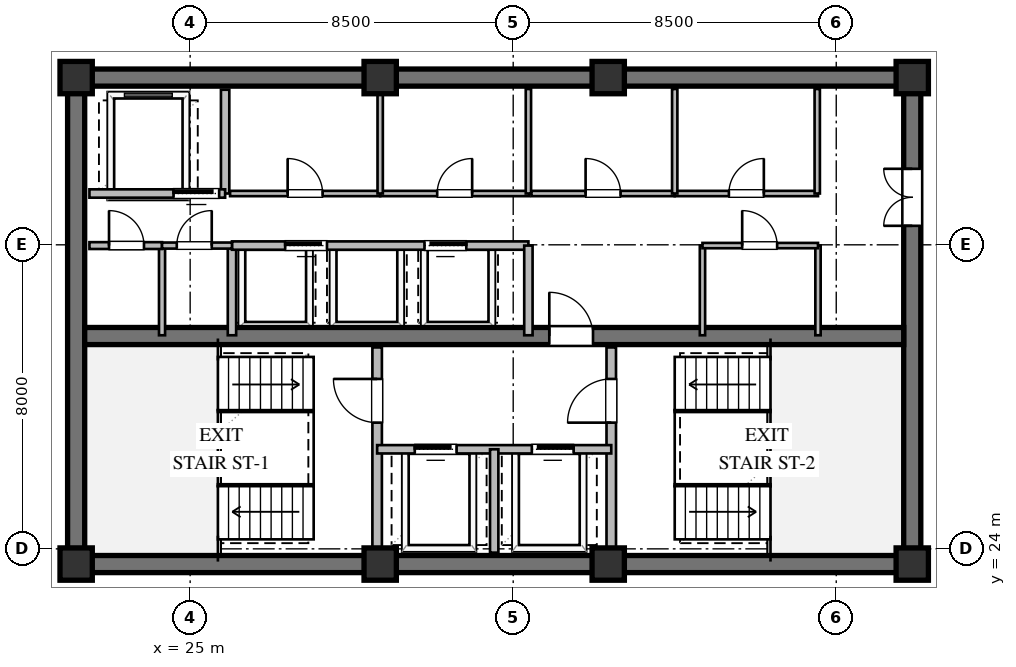
"""IFC4 building model, lengths in metres.
Left out: names, types, materials, properties, quantities, classifications, styles, units other than length and angle.
Written with IfcOpenShell. Run it as: python <this file> out.ifc"""

import sys

from ifc_helpers import new_model, si_unit, direction, frame, frame_2d, origin, origin_2d, place, context, subcontext, project, spatial, rectangle, extrude, element, fill, save


model = new_model("IFC4")
c1 = context("Model", 3, precision=1e-05, world=origin(), true_north=direction((0.0, 1.0)))
c2 = subcontext(c1, "Body", "Model", "MODEL_VIEW")
j1 = project(units=[si_unit("LENGTHUNIT", "METRE"), si_unit("PLANEANGLEUNIT", "RADIAN")], contexts=[c1])
p1 = place(None, origin())
s1 = spatial("IfcSite", under=j1, at=p1, CompositionType="ELEMENT")
p2 = place(p1, origin())
s2 = spatial("IfcBuilding", under=s1, at=p2, CompositionType="ELEMENT")
p3 = place(p2, frame((0.0, 0.0, 238.8)))
s3 = spatial("IfcBuildingStorey", under=s2, at=p3, CompositionType="ELEMENT", Elevation=238.8)
for number, where, z_axis, x_axis in (
    (1, (21.775, 23.6, 0.0), (0.0, 0.0, 1.0), (1.0, 0.0, 0.0)),
    (2, (21.775, 36.4, 0.0), (0.0, 0.0, 1.0), (1.0, 0.0, 0.0)),
):
    element("IfcWall", number, at=place(p3, frame(where, z_axis=z_axis, x_axis=x_axis)), inside=s3, PredefinedType="SHEAR", context=c2, shape_type="SweptSolid", body=[
        extrude(rectangle(XDim=22.45, YDim=0.45, at=frame_2d((11.225, 0.0))), origin(), (0.0, 0.0, 1.0), 3.36),
    ])
p4 = place(p3, frame((22.0, 23.825, 0.0), z_axis=(0.0, 0.0, 1.0), x_axis=(0.0, 1.0, 0.0)))
e3 = element("IfcWall", 3, at=p4, inside=s3, PredefinedType="SHEAR", context=c2, shape_type="SweptSolid", body=[
    extrude(rectangle(XDim=12.35, YDim=0.45, at=frame_2d((6.175, 0.0))), origin(), (0.0, 0.0, 1.0), 3.36),
])
p5 = place(p3, frame((44.0, 23.825, 0.0), z_axis=(0.0, 0.0, 1.0), x_axis=(0.0, 1.0, 0.0)))
e4 = element("IfcWall", 4, at=p5, inside=s3, PredefinedType="SHEAR", context=c2, shape_type="SweptSolid", body=[
    extrude(rectangle(XDim=12.35, YDim=0.45, at=frame_2d((6.175, 0.0))), origin(), (0.0, 0.0, 1.0), 3.36),
])
p6 = place(p5, frame((8.675, 0.0, 0.0)))
e5 = element("IfcOpeningElement", 5, at=p6, cuts=e4, PredefinedType="OPENING", context=c2, shape_type="SweptSolid", body=[
    extrude(rectangle(XDim=1.5, YDim=2.15, at=frame_2d((0.75, 1.075))), frame((0.0, 0.235, 0.0), z_axis=(0.0, -1.0, 0.0), x_axis=(1.0, 0.0, 0.0)), (0.0, 0.0, 1.0), 0.47),
])
p7 = place(p3, frame((22.225, 29.6, 0.0), z_axis=(0.0, 0.0, 1.0), x_axis=(1.0, 0.0, 0.0)))
e6 = element("IfcWall", 6, at=p7, inside=s3, PredefinedType="SHEAR", context=c2, shape_type="SweptSolid", body=[
    extrude(rectangle(XDim=21.55, YDim=0.45, at=frame_2d((10.775, 0.0))), origin(), (0.0, 0.0, 1.0), 3.36),
])
p8 = place(p7, frame((12.225, 0.0, 0.0)))
e7 = element("IfcOpeningElement", 7, at=p8, cuts=e6, PredefinedType="OPENING", context=c2, shape_type="SweptSolid", body=[
    extrude(rectangle(XDim=1.15, YDim=2.1, at=frame_2d((0.575, 1.05))), frame((0.0, 0.235, 0.0), z_axis=(0.0, -1.0, 0.0), x_axis=(1.0, 0.0, 0.0)), (0.0, 0.0, 1.0), 0.47),
])
for number, where, z_axis, x_axis in (
    (8, (22.0, 23.6, 0.0), (0.0, 0.0, 1.0), (1.0, 0.0, 0.0)),
    (9, (30.0, 23.6, 0.0), (0.0, 0.0, 1.0), (1.0, 0.0, 0.0)),
    (10, (36.0, 23.6, 0.0), (0.0, 0.0, 1.0), (1.0, 0.0, 0.0)),
    (11, (44.0, 23.6, 0.0), (0.0, 0.0, 1.0), (1.0, 0.0, 0.0)),
    (12, (44.0, 36.4, 0.0), (0.0, 0.0, 1.0), (1.0, 0.0, 0.0)),
    (13, (36.0, 36.4, 0.0), (0.0, 0.0, 1.0), (1.0, 0.0, 0.0)),
    (14, (30.0, 36.4, 0.0), (0.0, 0.0, 1.0), (1.0, 0.0, 0.0)),
    (15, (22.0, 36.4, 0.0), (0.0, 0.0, 1.0), (1.0, 0.0, 0.0)),
):
    element("IfcColumn", number, at=place(p3, frame(where, z_axis=z_axis, x_axis=x_axis)), inside=s3, PredefinedType="COLUMN", context=c2, shape_type="SweptSolid", body=[
        extrude(rectangle(XDim=0.85, YDim=0.85, at=origin_2d()), origin(), (0.0, 0.0, 1.0), 3.6),
    ])
p9 = place(p3, frame((29.92, 23.9, 0.0), z_axis=(0.0, 0.0, 1.0), x_axis=(0.0, 1.0, 0.0)))
e16 = element("IfcWall", 16, at=p9, inside=s3, PredefinedType="SOLIDWALL", context=c2, shape_type="SweptSolid", body=[
    extrude(rectangle(XDim=5.4, YDim=0.25, at=frame_2d((2.7, 0.0))), origin(), (0.0, 0.0, 1.0), 3.36),
])
p10 = place(p9, frame((3.421, 0.0, 0.0)))
e17 = element("IfcOpeningElement", 17, at=p10, cuts=e16, PredefinedType="OPENING", context=c2, shape_type="SweptSolid", body=[
    extrude(rectangle(XDim=1.15, YDim=2.1, at=frame_2d((0.575, 1.05))), frame((0.0, 0.135, 0.0), z_axis=(0.0, -1.0, 0.0), x_axis=(1.0, 0.0, 0.0)), (0.0, 0.0, 1.0), 0.27),
])
p11 = place(p3, frame((36.08, 23.9, 0.0), z_axis=(0.0, 0.0, 1.0), x_axis=(0.0, 1.0, 0.0)))
e18 = element("IfcWall", 18, at=p11, inside=s3, PredefinedType="SOLIDWALL", context=c2, shape_type="SweptSolid", body=[
    extrude(rectangle(XDim=5.4, YDim=0.25, at=frame_2d((2.7, 0.0))), origin(), (0.0, 0.0, 1.0), 3.36),
])
p12 = place(p11, frame((3.421, 0.0, 0.0)))
e19 = element("IfcOpeningElement", 19, at=p12, cuts=e18, PredefinedType="OPENING", context=c2, shape_type="SweptSolid", body=[
    extrude(rectangle(XDim=1.15, YDim=2.1, at=frame_2d((0.575, 1.05))), frame((0.0, 0.135, 0.0), z_axis=(0.0, -1.0, 0.0), x_axis=(1.0, 0.0, 0.0)), (0.0, 0.0, 1.0), 0.27),
])
p13 = place(p3, frame((29.92, 26.62, 0.0), z_axis=(0.0, 0.0, 1.0), x_axis=(1.0, 0.0, 0.0)))
e20 = element("IfcWall", 20, at=p13, inside=s3, PredefinedType="SOLIDWALL", context=c2, shape_type="SweptSolid", body=[
    extrude(rectangle(XDim=6.16, YDim=0.22, at=frame_2d((3.08, 0.0))), origin(), (0.0, 0.0, 1.0), 3.36),
])
p14 = place(p13, frame((0.99, 0.0, 0.0)))
e21 = element("IfcOpeningElement", 21, at=p14, cuts=e20, PredefinedType="OPENING", context=c2, shape_type="SweptSolid", body=[
    extrude(rectangle(XDim=1.1, YDim=2.1, at=frame_2d((0.55, 1.05))), frame((0.0, 0.12, 0.0), z_axis=(0.0, -1.0, 0.0), x_axis=(1.0, 0.0, 0.0)), (0.0, 0.0, 1.0), 0.24),
])
p15 = place(p13, frame((4.07, 0.0, 0.0)))
e22 = element("IfcOpeningElement", 22, at=p15, cuts=e20, PredefinedType="OPENING", context=c2, shape_type="SweptSolid", body=[
    extrude(rectangle(XDim=1.1, YDim=2.1, at=frame_2d((0.55, 1.05))), frame((0.0, 0.12, 0.0), z_axis=(0.0, -1.0, 0.0), x_axis=(1.0, 0.0, 0.0)), (0.0, 0.0, 1.0), 0.24),
])
p16 = place(p3, frame((33.0, 23.9, 0.0), z_axis=(0.0, 0.0, 1.0), x_axis=(0.0, 1.0, 0.0)))
e23 = element("IfcWall", 23, at=p16, inside=s3, PredefinedType="SOLIDWALL", context=c2, shape_type="SweptSolid", body=[
    extrude(rectangle(XDim=2.72, YDim=0.22, at=frame_2d((1.36, 0.0))), origin(), (0.0, 0.0, 1.0), 3.36),
])
p17 = place(p3, frame((25.92, 33.35, 0.0), z_axis=(0.0, 0.0, 1.0), x_axis=(0.0, 1.0, 0.0)))
e24 = element("IfcWall", 24, at=p17, inside=s3, PredefinedType="SOLIDWALL", context=c2, shape_type="SweptSolid", body=[
    extrude(rectangle(XDim=2.73, YDim=0.22, at=frame_2d((1.365, 0.0))), origin(), (0.0, 0.0, 1.0), 3.36),
])
p18 = place(p3, frame((22.35, 33.35, 0.0), z_axis=(0.0, 0.0, 1.0), x_axis=(1.0, 0.0, 0.0)))
e25 = element("IfcWall", 25, at=p18, inside=s3, PredefinedType="SOLIDWALL", context=c2, shape_type="SweptSolid", body=[
    extrude(rectangle(XDim=3.57, YDim=0.22, at=frame_2d((1.785, 0.0))), origin(), (0.0, 0.0, 1.0), 3.36),
])
p19 = place(p18, frame((2.213, 0.0, 0.0)))
e26 = element("IfcOpeningElement", 26, at=p19, cuts=e25, PredefinedType="OPENING", context=c2, shape_type="SweptSolid", body=[
    extrude(rectangle(XDim=1.2, YDim=2.1, at=frame_2d((0.6, 1.05))), frame((0.0, 0.12, 0.0), z_axis=(0.0, -1.0, 0.0), x_axis=(1.0, 0.0, 0.0)), (0.0, 0.0, 1.0), 0.24),
])
p20 = place(p3, frame((26.1, 29.62, 0.0), z_axis=(0.0, 0.0, 1.0), x_axis=(0.0, 1.0, 0.0)))
e27 = element("IfcWall", 27, at=p20, inside=s3, PredefinedType="SOLIDWALL", context=c2, shape_type="SweptSolid", body=[
    extrude(rectangle(XDim=2.36, YDim=0.22, at=frame_2d((1.18, 0.0))), origin(), (0.0, 0.0, 1.0), 3.36),
])
p21 = place(p3, frame((26.1, 31.98, 0.0), z_axis=(0.0, 0.0, 1.0), x_axis=(1.0, 0.0, 0.0)))
e28 = element("IfcWall", 28, at=p21, inside=s3, PredefinedType="SOLIDWALL", context=c2, shape_type="SweptSolid", body=[
    extrude(rectangle(XDim=7.8, YDim=0.22, at=frame_2d((3.9, 0.0))), origin(), (0.0, 0.0, 1.0), 3.36),
])
p22 = place(p21, frame((1.4, 0.0, 0.0)))
e29 = element("IfcOpeningElement", 29, at=p22, cuts=e28, PredefinedType="OPENING", context=c2, shape_type="SweptSolid", body=[
    extrude(rectangle(XDim=1.1, YDim=2.1, at=frame_2d((0.55, 1.05))), frame((0.0, 0.12, 0.0), z_axis=(0.0, -1.0, 0.0), x_axis=(1.0, 0.0, 0.0)), (0.0, 0.0, 1.0), 0.24),
])
p23 = place(p21, frame((5.066, 0.0, 0.0)))
e30 = element("IfcOpeningElement", 30, at=p23, cuts=e28, PredefinedType="OPENING", context=c2, shape_type="SweptSolid", body=[
    extrude(rectangle(XDim=1.1, YDim=2.1, at=frame_2d((0.55, 1.05))), frame((0.0, 0.12, 0.0), z_axis=(0.0, -1.0, 0.0), x_axis=(1.0, 0.0, 0.0)), (0.0, 0.0, 1.0), 0.24),
])
p24 = place(p3, frame((33.9, 29.62, 0.0), z_axis=(0.0, 0.0, 1.0), x_axis=(0.0, 1.0, 0.0)))
e31 = element("IfcWall", 31, at=p24, inside=s3, PredefinedType="SOLIDWALL", context=c2, shape_type="SweptSolid", body=[
    extrude(rectangle(XDim=2.36, YDim=0.22, at=frame_2d((1.18, 0.0))), origin(), (0.0, 0.0, 1.0), 3.36),
])
p25 = place(p3, frame((26.05, 33.35, 0.0), z_axis=(0.0, 0.0, 1.0), x_axis=(1.0, 0.0, 0.0)))
e32 = element("IfcWall", 32, at=p25, inside=s3, PredefinedType="PARTITIONING", context=c2, shape_type="SweptSolid", body=[
    extrude(rectangle(XDim=3.95, YDim=0.14, at=frame_2d((1.975, 0.0))), origin(), (0.0, 0.0, 1.0), 3.36),
])
p26 = place(p25, frame((1.515, 0.0, 0.0)))
e33 = element("IfcOpeningElement", 33, at=p26, cuts=e32, PredefinedType="OPENING", context=c2, shape_type="SweptSolid", body=[
    extrude(rectangle(XDim=0.92, YDim=2.1, at=frame_2d((0.46, 1.05))), frame((0.0, 0.08, 0.0), z_axis=(0.0, -1.0, 0.0), x_axis=(1.0, 0.0, 0.0)), (0.0, 0.0, 1.0), 0.16),
])
p27 = place(p3, frame((30.0, 33.35, 0.0), z_axis=(0.0, 0.0, 1.0), x_axis=(1.0, 0.0, 0.0)))
e34 = element("IfcWall", 34, at=p27, inside=s3, PredefinedType="PARTITIONING", context=c2, shape_type="SweptSolid", body=[
    extrude(rectangle(XDim=3.92, YDim=0.14, at=frame_2d((1.96, 0.0))), origin(), (0.0, 0.0, 1.0), 3.36),
])
p28 = place(p27, frame((1.5, 0.0, 0.0)))
e35 = element("IfcOpeningElement", 35, at=p28, cuts=e34, PredefinedType="OPENING", context=c2, shape_type="SweptSolid", body=[
    extrude(rectangle(XDim=0.92, YDim=2.1, at=frame_2d((0.46, 1.05))), frame((0.0, 0.08, 0.0), z_axis=(0.0, -1.0, 0.0), x_axis=(1.0, 0.0, 0.0)), (0.0, 0.0, 1.0), 0.16),
])
for number, where, z_axis, x_axis in (
    (36, (30.0, 33.35, 0.0), (0.0, 0.0, 1.0), (0.0, 1.0, 0.0)),
    (37, (33.9, 33.35, 0.0), (0.0, 0.0, 1.0), (0.0, 1.0, 0.0)),
):
    element("IfcWall", number, at=place(p3, frame(where, z_axis=z_axis, x_axis=x_axis)), inside=s3, PredefinedType="PARTITIONING", context=c2, shape_type="SweptSolid", body=[
        extrude(rectangle(XDim=2.75, YDim=0.14, at=frame_2d((1.375, 0.0))), origin(), (0.0, 0.0, 1.0), 3.36),
    ])
p29 = place(p3, frame((33.98, 33.35, 0.0), z_axis=(0.0, 0.0, 1.0), x_axis=(1.0, 0.0, 0.0)))
e38 = element("IfcWall", 38, at=p29, inside=s3, PredefinedType="PARTITIONING", context=c2, shape_type="SweptSolid", body=[
    extrude(rectangle(XDim=3.77, YDim=0.14, at=frame_2d((1.885, 0.0))), origin(), (0.0, 0.0, 1.0), 3.36),
])
p30 = place(p29, frame((1.425, 0.0, 0.0)))
e39 = element("IfcOpeningElement", 39, at=p30, cuts=e38, PredefinedType="OPENING", context=c2, shape_type="SweptSolid", body=[
    extrude(rectangle(XDim=0.92, YDim=2.1, at=frame_2d((0.46, 1.05))), frame((0.0, 0.08, 0.0), z_axis=(0.0, -1.0, 0.0), x_axis=(1.0, 0.0, 0.0)), (0.0, 0.0, 1.0), 0.16),
])
p31 = place(p3, frame((37.75, 33.35, 0.0), z_axis=(0.0, 0.0, 1.0), x_axis=(1.0, 0.0, 0.0)))
e40 = element("IfcWall", 40, at=p31, inside=s3, PredefinedType="PARTITIONING", context=c2, shape_type="SweptSolid", body=[
    extrude(rectangle(XDim=3.77, YDim=0.14, at=frame_2d((1.885, 0.0))), origin(), (0.0, 0.0, 1.0), 3.36),
])
p32 = place(p31, frame((1.425, 0.0, 0.0)))
e41 = element("IfcOpeningElement", 41, at=p32, cuts=e40, PredefinedType="OPENING", context=c2, shape_type="SweptSolid", body=[
    extrude(rectangle(XDim=0.92, YDim=2.1, at=frame_2d((0.46, 1.05))), frame((0.0, 0.08, 0.0), z_axis=(0.0, -1.0, 0.0), x_axis=(1.0, 0.0, 0.0)), (0.0, 0.0, 1.0), 0.16),
])
for number, where, z_axis, x_axis in (
    (42, (37.75, 33.35, 0.0), (0.0, 0.0, 1.0), (0.0, 1.0, 0.0)),
    (43, (41.5, 33.35, 0.0), (0.0, 0.0, 1.0), (0.0, 1.0, 0.0)),
):
    element("IfcWall", number, at=place(p3, frame(where, z_axis=z_axis, x_axis=x_axis)), inside=s3, PredefinedType="PARTITIONING", context=c2, shape_type="SweptSolid", body=[
        extrude(rectangle(XDim=2.75, YDim=0.14, at=frame_2d((1.375, 0.0))), origin(), (0.0, 0.0, 1.0), 3.36),
    ])
p33 = place(p3, frame((24.26, 29.62, 0.0), z_axis=(0.0, 0.0, 1.0), x_axis=(0.0, 1.0, 0.0)))
e44 = element("IfcWall", 44, at=p33, inside=s3, PredefinedType="PLUMBINGWALL", context=c2, shape_type="SweptSolid", body=[
    extrude(rectangle(XDim=2.36, YDim=0.16, at=frame_2d((1.18, 0.0))), origin(), (0.0, 0.0, 1.0), 3.36),
])
p34 = place(p3, frame((22.35, 31.98, 0.0), z_axis=(0.0, 0.0, 1.0), x_axis=(1.0, 0.0, 0.0)))
e45 = element("IfcWall", 45, at=p34, inside=s3, PredefinedType="PARTITIONING", context=c2, shape_type="SweptSolid", body=[
    extrude(rectangle(XDim=1.91, YDim=0.18, at=frame_2d((0.955, 0.0))), origin(), (0.0, 0.0, 1.0), 3.36),
])
p35 = place(p34, frame((0.515, 0.0, 0.0)))
e46 = element("IfcOpeningElement", 46, at=p35, cuts=e45, PredefinedType="OPENING", context=c2, shape_type="SweptSolid", body=[
    extrude(rectangle(XDim=0.92, YDim=2.1, at=frame_2d((0.46, 1.05))), frame((0.0, 0.1, 0.0), z_axis=(0.0, -1.0, 0.0), x_axis=(1.0, 0.0, 0.0)), (0.0, 0.0, 1.0), 0.2),
])
p36 = place(p3, frame((24.26, 31.98, 0.0), z_axis=(0.0, 0.0, 1.0), x_axis=(1.0, 0.0, 0.0)))
e47 = element("IfcWall", 47, at=p36, inside=s3, PredefinedType="PLUMBINGWALL", context=c2, shape_type="SweptSolid", body=[
    extrude(rectangle(XDim=1.84, YDim=0.16, at=frame_2d((0.92, 0.0))), origin(), (0.0, 0.0, 1.0), 3.36),
])
p37 = place(p36, frame((0.388, 0.0, 0.0)))
e48 = element("IfcOpeningElement", 48, at=p37, cuts=e47, PredefinedType="OPENING", context=c2, shape_type="SweptSolid", body=[
    extrude(rectangle(XDim=0.92, YDim=2.1, at=frame_2d((0.46, 1.05))), frame((0.0, 0.09, 0.0), z_axis=(0.0, -1.0, 0.0), x_axis=(1.0, 0.0, 0.0)), (0.0, 0.0, 1.0), 0.18),
])
for number, where, z_axis, x_axis in (
    (49, (38.48, 29.62, 0.0), (0.0, 0.0, 1.0), (0.0, 1.0, 0.0)),
    (50, (41.52, 29.62, 0.0), (0.0, 0.0, 1.0), (0.0, 1.0, 0.0)),
):
    element("IfcWall", number, at=place(p3, frame(where, z_axis=z_axis, x_axis=x_axis)), inside=s3, PredefinedType="PARTITIONING", context=c2, shape_type="SweptSolid", body=[
        extrude(rectangle(XDim=2.36, YDim=0.14, at=frame_2d((1.18, 0.0))), origin(), (0.0, 0.0, 1.0), 3.36),
    ])
p38 = place(p3, frame((38.48, 31.98, 0.0), z_axis=(0.0, 0.0, 1.0), x_axis=(1.0, 0.0, 0.0)))
e51 = element("IfcWall", 51, at=p38, inside=s3, PredefinedType="PARTITIONING", context=c2, shape_type="SweptSolid", body=[
    extrude(rectangle(XDim=3.04, YDim=0.14, at=frame_2d((1.52, 0.0))), origin(), (0.0, 0.0, 1.0), 3.36),
])
p39 = place(p38, frame((1.045, 0.0, 0.0)))
e52 = element("IfcOpeningElement", 52, at=p39, cuts=e51, PredefinedType="OPENING", context=c2, shape_type="SweptSolid", body=[
    extrude(rectangle(XDim=0.92, YDim=2.1, at=frame_2d((0.46, 1.05))), frame((0.0, 0.08, 0.0), z_axis=(0.0, -1.0, 0.0), x_axis=(1.0, 0.0, 0.0)), (0.0, 0.0, 1.0), 0.16),
])
p40 = place(p10, origin())
e53 = element("IfcDoor", 53, at=p40, inside=s3, OperationType="SINGLE_SWING_RIGHT", PredefinedType="DOOR", context=c2, shape_type="SweptSolid", body=[
    extrude(rectangle(XDim=1.15, YDim=2.1, at=frame_2d((0.575, 1.05))), frame((0.0, 0.025, 0.0), z_axis=(0.0, -1.0, 0.0), x_axis=(1.0, 0.0, 0.0)), (0.0, 0.0, 1.0), 0.05),
])
fill(e17, e53)
p41 = place(p12, origin())
e54 = element("IfcDoor", 54, at=p41, inside=s3, OperationType="SINGLE_SWING_LEFT", PredefinedType="DOOR", context=c2, shape_type="SweptSolid", body=[
    extrude(rectangle(XDim=1.15, YDim=2.1, at=frame_2d((0.575, 1.05))), frame((0.0, 0.025, 0.0), z_axis=(0.0, -1.0, 0.0), x_axis=(1.0, 0.0, 0.0)), (0.0, 0.0, 1.0), 0.05),
])
fill(e19, e54)
p42 = place(p14, origin())
e55 = element("IfcDoor", 55, at=p42, inside=s3, OperationType="SLIDING_TO_LEFT", PredefinedType="DOOR", context=c2, shape_type="SweptSolid", body=[
    extrude(rectangle(XDim=1.1, YDim=2.1, at=frame_2d((0.55, 1.05))), frame((0.0, 0.025, 0.0), z_axis=(0.0, -1.0, 0.0), x_axis=(1.0, 0.0, 0.0)), (0.0, 0.0, 1.0), 0.05),
])
fill(e21, e55)
p43 = place(p15, origin())
e56 = element("IfcDoor", 56, at=p43, inside=s3, OperationType="SLIDING_TO_RIGHT", PredefinedType="DOOR", context=c2, shape_type="SweptSolid", body=[
    extrude(rectangle(XDim=1.1, YDim=2.1, at=frame_2d((0.55, 1.05))), frame((0.0, 0.025, 0.0), z_axis=(0.0, -1.0, 0.0), x_axis=(1.0, 0.0, 0.0)), (0.0, 0.0, 1.0), 0.05),
])
fill(e22, e56)
p44 = place(p8, origin())
e57 = element("IfcDoor", 57, at=p44, inside=s3, OperationType="SINGLE_SWING_LEFT", PredefinedType="DOOR", context=c2, shape_type="SweptSolid", body=[
    extrude(rectangle(XDim=1.15, YDim=2.1, at=frame_2d((0.575, 1.05))), frame((0.0, 0.025, 0.0), z_axis=(0.0, -1.0, 0.0), x_axis=(1.0, 0.0, 0.0)), (0.0, 0.0, 1.0), 0.05),
])
fill(e7, e57)
p45 = place(p6, origin())
e58 = element("IfcDoor", 58, at=p45, inside=s3, OperationType="DOUBLE_DOOR_SINGLE_SWING", PredefinedType="DOOR", context=c2, shape_type="SweptSolid", body=[
    extrude(rectangle(XDim=1.5, YDim=2.15, at=frame_2d((0.75, 1.075))), frame((0.0, 0.025, 0.0), z_axis=(0.0, -1.0, 0.0), x_axis=(1.0, 0.0, 0.0)), (0.0, 0.0, 1.0), 0.05),
])
fill(e5, e58)
p46 = place(p19, origin())
e59 = element("IfcDoor", 59, at=p46, inside=s3, OperationType="SLIDING_TO_LEFT", PredefinedType="DOOR", context=c2, shape_type="SweptSolid", body=[
    extrude(rectangle(XDim=1.2, YDim=2.1, at=frame_2d((0.6, 1.05))), frame((0.0, 0.025, 0.0), z_axis=(0.0, -1.0, 0.0), x_axis=(1.0, 0.0, 0.0)), (0.0, 0.0, 1.0), 0.05),
])
fill(e26, e59)
p47 = place(p22, origin())
e60 = element("IfcDoor", 60, at=p47, inside=s3, OperationType="SLIDING_TO_LEFT", PredefinedType="DOOR", context=c2, shape_type="SweptSolid", body=[
    extrude(rectangle(XDim=1.1, YDim=2.1, at=frame_2d((0.55, 1.05))), frame((0.0, 0.025, 0.0), z_axis=(0.0, -1.0, 0.0), x_axis=(1.0, 0.0, 0.0)), (0.0, 0.0, 1.0), 0.05),
])
fill(e29, e60)
p48 = place(p23, origin())
e61 = element("IfcDoor", 61, at=p48, inside=s3, OperationType="SLIDING_TO_RIGHT", PredefinedType="DOOR", context=c2, shape_type="SweptSolid", body=[
    extrude(rectangle(XDim=1.1, YDim=2.1, at=frame_2d((0.55, 1.05))), frame((0.0, 0.025, 0.0), z_axis=(0.0, -1.0, 0.0), x_axis=(1.0, 0.0, 0.0)), (0.0, 0.0, 1.0), 0.05),
])
fill(e30, e61)
p49 = place(p26, origin())
e62 = element("IfcDoor", 62, at=p49, inside=s3, OperationType="SINGLE_SWING_LEFT", PredefinedType="DOOR", context=c2, shape_type="SweptSolid", body=[
    extrude(rectangle(XDim=0.92, YDim=2.1, at=frame_2d((0.46, 1.05))), frame((0.0, 0.025, 0.0), z_axis=(0.0, -1.0, 0.0), x_axis=(1.0, 0.0, 0.0)), (0.0, 0.0, 1.0), 0.05),
])
fill(e33, e62)
p50 = place(p28, origin())
e63 = element("IfcDoor", 63, at=p50, inside=s3, OperationType="SINGLE_SWING_RIGHT", PredefinedType="DOOR", context=c2, shape_type="SweptSolid", body=[
    extrude(rectangle(XDim=0.92, YDim=2.1, at=frame_2d((0.46, 1.05))), frame((0.0, 0.025, 0.0), z_axis=(0.0, -1.0, 0.0), x_axis=(1.0, 0.0, 0.0)), (0.0, 0.0, 1.0), 0.05),
])
fill(e35, e63)
p51 = place(p30, origin())
e64 = element("IfcDoor", 64, at=p51, inside=s3, OperationType="SINGLE_SWING_LEFT", PredefinedType="DOOR", context=c2, shape_type="SweptSolid", body=[
    extrude(rectangle(XDim=0.92, YDim=2.1, at=frame_2d((0.46, 1.05))), frame((0.0, 0.025, 0.0), z_axis=(0.0, -1.0, 0.0), x_axis=(1.0, 0.0, 0.0)), (0.0, 0.0, 1.0), 0.05),
])
fill(e39, e64)
p52 = place(p32, origin())
e65 = element("IfcDoor", 65, at=p52, inside=s3, OperationType="SINGLE_SWING_RIGHT", PredefinedType="DOOR", context=c2, shape_type="SweptSolid", body=[
    extrude(rectangle(XDim=0.92, YDim=2.1, at=frame_2d((0.46, 1.05))), frame((0.0, 0.025, 0.0), z_axis=(0.0, -1.0, 0.0), x_axis=(1.0, 0.0, 0.0)), (0.0, 0.0, 1.0), 0.05),
])
fill(e41, e65)
p53 = place(p35, origin())
e66 = element("IfcDoor", 66, at=p53, inside=s3, OperationType="SINGLE_SWING_LEFT", PredefinedType="DOOR", context=c2, shape_type="SweptSolid", body=[
    extrude(rectangle(XDim=0.92, YDim=2.1, at=frame_2d((0.46, 1.05))), frame((0.0, 0.025, 0.0), z_axis=(0.0, -1.0, 0.0), x_axis=(1.0, 0.0, 0.0)), (0.0, 0.0, 1.0), 0.05),
])
fill(e46, e66)
p54 = place(p37, origin())
e67 = element("IfcDoor", 67, at=p54, inside=s3, OperationType="SINGLE_SWING_RIGHT", PredefinedType="DOOR", context=c2, shape_type="SweptSolid", body=[
    extrude(rectangle(XDim=0.92, YDim=2.1, at=frame_2d((0.46, 1.05))), frame((0.0, 0.025, 0.0), z_axis=(0.0, -1.0, 0.0), x_axis=(1.0, 0.0, 0.0)), (0.0, 0.0, 1.0), 0.05),
])
fill(e48, e67)
p55 = place(p39, origin())
e68 = element("IfcDoor", 68, at=p55, inside=s3, OperationType="SINGLE_SWING_LEFT", PredefinedType="DOOR", context=c2, shape_type="SweptSolid", body=[
    extrude(rectangle(XDim=0.92, YDim=2.1, at=frame_2d((0.46, 1.05))), frame((0.0, 0.025, 0.0), z_axis=(0.0, -1.0, 0.0), x_axis=(1.0, 0.0, 0.0)), (0.0, 0.0, 1.0), 0.05),
])
fill(e52, e68)
save(model, sys.argv[1])
